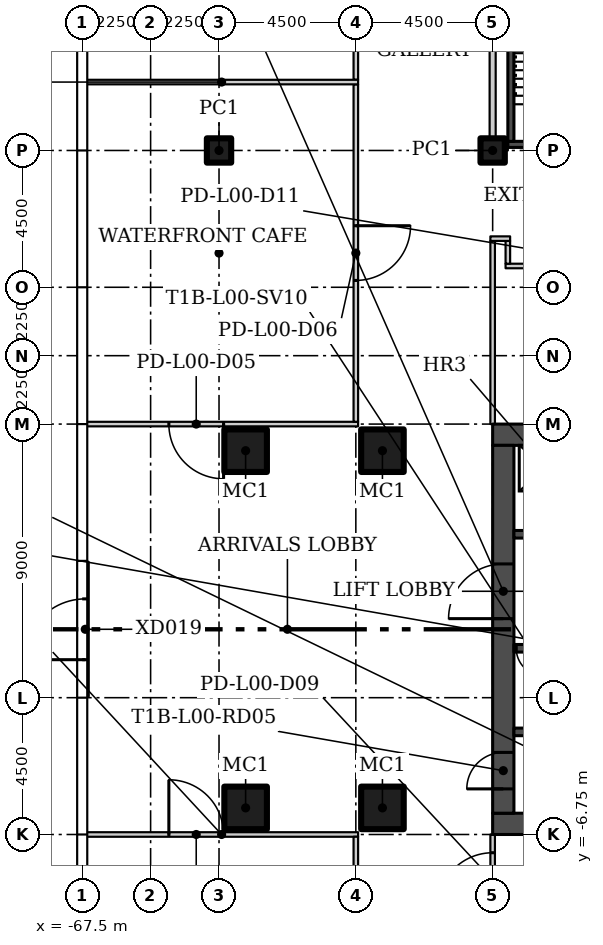
"""IFC4 building model, lengths in metres.
Left out: names, types, materials, properties, quantities, classifications, styles, units other than length and angle.
Written with IfcOpenShell. Run it as: python <this file> out.ifc"""

import sys

from ifc_helpers import new_model, si_unit, direction, frame, frame_2d, origin, origin_2d, place, context, subcontext, project, spatial, rectangle, hollow_rectangle, extrude, element, fill, save


model = new_model("IFC4")
c1 = context("Model", 3, precision=1e-05, world=origin(), true_north=direction((0.0, 1.0)))
c2 = subcontext(c1, "Body", "Model", "MODEL_VIEW")
j1 = project(units=[si_unit("LENGTHUNIT", "METRE"), si_unit("PLANEANGLEUNIT", "RADIAN")], contexts=[c1])
p1 = place(None, origin())
s1 = spatial("IfcSite", under=j1, at=p1, CompositionType="ELEMENT")
p2 = place(p1, origin())
s2 = spatial("IfcBuilding", under=s1, at=p2, CompositionType="ELEMENT")
p3 = place(p2, origin())
s3 = spatial("IfcBuildingStorey", under=s2, at=p3, CompositionType="ELEMENT", Elevation=0.0)
for number, where in (
    (1, (-57.625, -5.875, 0.0)),
    (2, (-62.125, -5.875, 0.0)),
    (3, (-57.625, 5.875, 0.0)),
    (4, (-62.125, 5.875, 0.0)),
):
    element("IfcColumn", number, at=place(p3, frame(where)), inside=s3, PredefinedType="COLUMN", context=c2, shape_type="SweptSolid", body=[
        extrude(hollow_rectangle(XDim=1.4, YDim=1.4, WallThickness=0.06, at=origin_2d()), origin(), (0.0, 0.0, 1.0), 6.1),
    ])
for number, where in (
    (5, (-63.0, 15.75, 0.0)),
    (6, (-54.0, 15.75, 0.0)),
):
    element("IfcColumn", number, at=place(p3, frame(where)), inside=s3, PredefinedType="COLUMN", context=c2, shape_type="SweptSolid", body=[
        extrude(hollow_rectangle(XDim=0.8, YDim=0.8, WallThickness=0.03, at=origin_2d()), origin(), (0.0, 0.0, 1.0), 6.1),
    ])
p4 = place(p3, frame((-53.575, 11.95, 0.0)))
e7 = element("IfcWall", 7, at=p4, inside=s3, PredefinedType="PARTITIONING", context=c2, shape_type="SweptSolid", body=[
    extrude(rectangle(XDim=9.175, YDim=0.15, at=frame_2d((4.587, 0.0))), origin(), (0.0, 0.0, 1.0), 6.1),
])
p5 = place(p4, frame((3.175, 0.0, 0.0)))
e8 = element("IfcOpeningElement", 8, at=p5, cuts=e7, PredefinedType="OPENING", context=c2, shape_type="SweptSolid", body=[
    extrude(rectangle(XDim=1.8, YDim=2.4, at=frame_2d((0.9, 1.2))), frame((0.0, 0.085, 0.0), z_axis=(0.0, -1.0, 0.0), x_axis=(1.0, 0.0, 0.0)), (0.0, 0.0, 1.0), 0.17),
])
p6 = place(p3, frame((-58.425, 6.75, 0.0), z_axis=(0.0, 0.0, 1.0), x_axis=(-1.0, 0.0, 0.0)))
e9 = element("IfcWall", 9, at=p6, inside=s3, PredefinedType="PARTITIONING", context=c2, shape_type="SweptSolid", body=[
    extrude(rectangle(XDim=8.98, YDim=0.15, at=frame_2d((4.49, 0.0))), origin(), (0.0, 0.0, 1.0), 6.1),
])
p7 = place(p6, frame((4.425, 0.0, 0.0)))
e10 = element("IfcOpeningElement", 10, at=p7, cuts=e9, PredefinedType="OPENING", context=c2, shape_type="SweptSolid", body=[
    extrude(rectangle(XDim=1.8, YDim=2.4, at=frame_2d((0.9, 1.2))), frame((0.0, 0.085, 0.0), z_axis=(0.0, -1.0, 0.0), x_axis=(1.0, 0.0, 0.0)), (0.0, 0.0, 1.0), 0.17),
])
p8 = place(p3, frame((-67.405, -6.75, 0.0)))
e11 = element("IfcWall", 11, at=p8, inside=s3, PredefinedType="PARTITIONING", context=c2, shape_type="SweptSolid", body=[
    extrude(rectangle(XDim=8.98, YDim=0.15, at=frame_2d((4.49, 0.0))), origin(), (0.0, 0.0, 1.0), 6.1),
])
p9 = place(p8, frame((2.755, 0.0, 0.0)))
e12 = element("IfcOpeningElement", 12, at=p9, cuts=e11, PredefinedType="OPENING", context=c2, shape_type="SweptSolid", body=[
    extrude(rectangle(XDim=1.8, YDim=2.4, at=frame_2d((0.9, 1.2))), frame((0.0, 0.085, 0.0), z_axis=(0.0, -1.0, 0.0), x_axis=(1.0, 0.0, 0.0)), (0.0, 0.0, 1.0), 0.17),
])
p10 = place(p3, frame((-54.0, -17.275, 0.0), z_axis=(0.0, 0.0, 1.0), x_axis=(0.0, 1.0, 0.0)))
e13 = element("IfcWall", 13, at=p10, inside=s3, PredefinedType="PARTITIONING", context=c2, shape_type="SweptSolid", body=[
    extrude(rectangle(XDim=10.525, YDim=0.15, at=frame_2d((5.262, 0.0))), origin(), (0.0, 0.0, 1.0), 6.1),
])
p11 = place(p10, frame((3.625, 0.0, 0.0)))
e14 = element("IfcOpeningElement", 14, at=p11, cuts=e13, PredefinedType="OPENING", context=c2, shape_type="SweptSolid", body=[
    extrude(rectangle(XDim=1.8, YDim=2.4, at=frame_2d((0.9, 1.2))), frame((0.0, 0.085, 0.0), z_axis=(0.0, -1.0, 0.0), x_axis=(1.0, 0.0, 0.0)), (0.0, 0.0, 1.0), 0.17),
])
p12 = place(p10, frame((8.125, 0.0, 0.0)))
e15 = element("IfcOpeningElement", 15, at=p12, cuts=e13, PredefinedType="OPENING", context=c2, shape_type="SweptSolid", body=[
    extrude(rectangle(XDim=1.8, YDim=2.4, at=frame_2d((0.9, 1.2))), frame((0.0, 0.085, 0.0), z_axis=(0.0, -1.0, 0.0), x_axis=(1.0, 0.0, 0.0)), (0.0, 0.0, 1.0), 0.17),
])
p13 = place(p3, frame((-54.0, 6.75, 0.0), z_axis=(0.0, 0.0, 1.0), x_axis=(0.0, 1.0, 0.0)))
e16 = element("IfcWall", 16, at=p13, inside=s3, PredefinedType="PARTITIONING", context=c2, shape_type="SweptSolid", body=[
    extrude(rectangle(XDim=6.025, YDim=0.15, at=frame_2d((3.012, 0.0))), origin(), (0.0, 0.0, 1.0), 6.1),
])
p14 = place(p3, frame((-54.0, 33.655, 0.0), z_axis=(0.0, 0.0, 1.0), x_axis=(0.0, -1.0, 0.0)))
e17 = element("IfcWall", 17, at=p14, inside=s3, PredefinedType="PARTITIONING", context=c2, shape_type="SweptSolid", body=[
    extrude(rectangle(XDim=17.705, YDim=0.2, at=frame_2d((8.853, 0.0))), origin(), (0.0, 0.0, 1.0), 6.1),
])
p15 = place(p14, frame((7.455, 0.0, 0.0)))
e18 = element("IfcOpeningElement", 18, at=p15, cuts=e17, PredefinedType="OPENING", context=c2, shape_type="SweptSolid", body=[
    extrude(rectangle(XDim=1.0, YDim=2.1, at=frame_2d((0.5, 1.05))), frame((0.0, 0.11, 0.0), z_axis=(0.0, -1.0, 0.0), x_axis=(1.0, 0.0, 0.0)), (0.0, 0.0, 1.0), 0.22),
])
p16 = place(p3, frame((-58.5, 17.925, 0.0), z_axis=(0.0, 0.0, 1.0), x_axis=(0.0, -1.0, 0.0)))
e19 = element("IfcWall", 19, at=p16, inside=s3, PredefinedType="PARTITIONING", context=c2, shape_type="SweptSolid", body=[
    extrude(rectangle(XDim=11.1, YDim=0.15, at=frame_2d((5.55, 0.0))), origin(), (0.0, 0.0, 1.0), 6.1),
])
p17 = place(p16, frame((4.65, 0.0, 0.0)))
e20 = element("IfcOpeningElement", 20, at=p17, cuts=e19, PredefinedType="OPENING", context=c2, shape_type="SweptSolid", body=[
    extrude(rectangle(XDim=1.8, YDim=2.4, at=frame_2d((0.9, 1.2))), frame((0.0, 0.085, 0.0), z_axis=(0.0, -1.0, 0.0), x_axis=(1.0, 0.0, 0.0)), (0.0, 0.0, 1.0), 0.17),
])
p18 = place(p3, frame((-58.5, -6.825, 0.0), z_axis=(0.0, 0.0, 1.0), x_axis=(0.0, -1.0, 0.0)))
e21 = element("IfcWall", 21, at=p18, inside=s3, PredefinedType="PARTITIONING", context=c2, shape_type="SweptSolid", body=[
    extrude(rectangle(XDim=22.35, YDim=0.15, at=frame_2d((11.175, 0.0))), origin(), (0.0, 0.0, 1.0), 6.1),
])
p19 = place(p18, frame((6.9, 0.0, 0.0)))
e22 = element("IfcOpeningElement", 22, at=p19, cuts=e21, PredefinedType="OPENING", context=c2, shape_type="SweptSolid", body=[
    extrude(rectangle(XDim=1.8, YDim=2.4, at=frame_2d((0.9, 1.2))), frame((0.0, 0.085, 0.0), z_axis=(0.0, -1.0, 0.0), x_axis=(1.0, 0.0, 0.0)), (0.0, 0.0, 1.0), 0.17),
])
p20 = place(p18, frame((18.15, 0.0, 0.0)))
e23 = element("IfcOpeningElement", 23, at=p20, cuts=e21, PredefinedType="OPENING", context=c2, shape_type="SweptSolid", body=[
    extrude(rectangle(XDim=1.8, YDim=2.4, at=frame_2d((0.9, 1.2))), frame((0.0, 0.085, 0.0), z_axis=(0.0, -1.0, 0.0), x_axis=(1.0, 0.0, 0.0)), (0.0, 0.0, 1.0), 0.17),
])
p21 = place(p3, frame((-58.5, 18.075, 0.0), z_axis=(0.0, 0.0, 1.0), x_axis=(0.0, 1.0, 0.0)))
e24 = element("IfcWall", 24, at=p21, inside=s3, PredefinedType="PARTITIONING", context=c2, shape_type="SweptSolid", body=[
    extrude(rectangle(XDim=15.58, YDim=0.15, at=frame_2d((7.79, 0.0))), origin(), (0.0, 0.0, 1.0), 6.1),
])
p22 = place(p21, frame((7.35, 0.0, 0.0)))
e25 = element("IfcOpeningElement", 25, at=p22, cuts=e24, PredefinedType="OPENING", context=c2, shape_type="SweptSolid", body=[
    extrude(rectangle(XDim=0.9, YDim=2.1, at=frame_2d((0.45, 1.05))), frame((0.0, 0.085, 0.0), z_axis=(0.0, -1.0, 0.0), x_axis=(1.0, 0.0, 0.0)), (0.0, 0.0, 1.0), 0.17),
])
p23 = place(p3, frame((-53.5, 12.775, 0.0), z_axis=(0.0, 0.0, 1.0), x_axis=(0.0, -1.0, 0.0)))
e26 = element("IfcWall", 26, at=p23, inside=s3, PredefinedType="PARTITIONING", context=c2, shape_type="SweptSolid", body=[
    extrude(rectangle(XDim=0.75, YDim=0.15, at=frame_2d((0.375, 0.0))), origin(), (0.0, 0.0, 1.0), 6.1),
])
p24 = place(p3, frame((-54.075, 12.85, 0.0)))
e27 = element("IfcWall", 27, at=p24, inside=s3, PredefinedType="PARTITIONING", context=c2, shape_type="SweptSolid", body=[
    extrude(rectangle(XDim=0.65, YDim=0.15, at=frame_2d((0.325, 0.0))), origin(), (0.0, 0.0, 1.0), 6.1),
])
p25 = place(p3, frame((-54.1, 15.85, 0.0)))
e28 = element("IfcWall", 28, at=p25, inside=s3, PredefinedType="PARTITIONING", context=c2, shape_type="SweptSolid", body=[
    extrude(rectangle(XDim=0.6, YDim=0.2, at=frame_2d((0.3, 0.0))), origin(), (0.0, 0.0, 1.0), 6.1),
])
p26 = place(p3, frame((-58.425, 18.0, 0.0), z_axis=(0.0, 0.0, 1.0), x_axis=(-1.0, 0.0, 0.0)))
e29 = element("IfcWall", 29, at=p26, inside=s3, PredefinedType="PARTITIONING", context=c2, shape_type="SweptSolid", body=[
    extrude(rectangle(XDim=8.98, YDim=0.15, at=frame_2d((4.49, 0.0))), origin(), (0.0, 0.0, 1.0), 6.1),
])
p27 = place(p3, frame((-67.4, -2.21, 0.0), z_axis=(0.0, 0.0, 1.0), x_axis=(0.0, 1.0, 0.0)))
e30 = element("IfcWall", 30, at=p27, inside=s3, PredefinedType="SOLIDWALL", context=c2, shape_type="SweptSolid", body=[
    extrude(rectangle(XDim=4.42, YDim=0.2, at=frame_2d((2.21, 0.0))), origin(), (0.0, 0.0, 1.0), 3.0),
])
p28 = place(p27, frame((1.21, 0.0, 0.0)))
e31 = element("IfcOpeningElement", 31, at=p28, cuts=e30, PredefinedType="OPENING", context=c2, shape_type="SweptSolid", body=[
    extrude(rectangle(XDim=2.0, YDim=2.4, at=frame_2d((1.0, 1.2))), frame((0.0, 0.11, 0.0), z_axis=(0.0, -1.0, 0.0), x_axis=(1.0, 0.0, 0.0)), (0.0, 0.0, 1.0), 0.22),
])
for number, where, z_axis, x_axis in (
    (32, (-40.5, -6.4, 0.0), (0.0, 0.0, 1.0), (-1.0, 0.0, 0.0)),
    (33, (-40.5, 6.4, 0.0), (0.0, 0.0, 1.0), (-1.0, 0.0, 0.0)),
):
    element("IfcWall", number, at=place(p3, frame(where, z_axis=z_axis, x_axis=x_axis)), inside=s3, PredefinedType="SHEAR", context=c2, shape_type="SweptSolid", body=[
        extrude(rectangle(XDim=13.5, YDim=0.7, at=frame_2d((6.75, 0.0))), origin(), (0.0, 0.0, 1.0), 6.1),
    ])
p29 = place(p3, frame((-53.65, -6.05, 0.0), z_axis=(0.0, 0.0, 1.0), x_axis=(0.0, 1.0, 0.0)))
e34 = element("IfcWall", 34, at=p29, inside=s3, PredefinedType="SHEAR", context=c2, shape_type="SweptSolid", body=[
    extrude(rectangle(XDim=12.1, YDim=0.7, at=frame_2d((6.05, 0.0))), origin(), (0.0, 0.0, 1.0), 6.1),
])
p30 = place(p29, frame((0.8, 0.0, 0.0)))
e35 = element("IfcOpeningElement", 35, at=p30, cuts=e34, PredefinedType="OPENING", context=c2, shape_type="SweptSolid", body=[
    extrude(rectangle(XDim=1.2, YDim=2.1, at=frame_2d((0.6, 1.05))), frame((0.0, 0.36, 0.0), z_axis=(0.0, -1.0, 0.0), x_axis=(1.0, 0.0, 0.0)), (0.0, 0.0, 1.0), 0.72),
])
p31 = place(p29, frame((6.4, 0.0, 0.0)))
e36 = element("IfcOpeningElement", 36, at=p31, cuts=e34, PredefinedType="OPENING", context=c2, shape_type="SweptSolid", body=[
    extrude(rectangle(XDim=1.8, YDim=2.4, at=frame_2d((0.9, 1.2))), frame((0.0, 0.36, 0.0), z_axis=(0.0, -1.0, 0.0), x_axis=(1.0, 0.0, 0.0)), (0.0, 0.0, 1.0), 0.72),
])
p32 = place(p3, frame((-41.2, -3.375, 0.0), z_axis=(0.0, 0.0, 1.0), x_axis=(-1.0, 0.0, 0.0)))
e37 = element("IfcWall", 37, at=p32, inside=s3, PredefinedType="SHEAR", context=c2, shape_type="SweptSolid", body=[
    extrude(rectangle(XDim=12.1, YDim=0.25, at=frame_2d((6.05, 0.0))), origin(), (0.0, 0.0, 1.0), 6.1),
])
p33 = place(p32, frame((0.05, 0.0, 0.0)))
e38 = element("IfcOpeningElement", 38, at=p33, cuts=e37, PredefinedType="OPENING", context=c2, shape_type="SweptSolid", body=[
    extrude(rectangle(XDim=1.1, YDim=2.1, at=frame_2d((0.55, 1.05))), frame((0.0, 0.135, 0.0), z_axis=(0.0, -1.0, 0.0), x_axis=(1.0, 0.0, 0.0)), (0.0, 0.0, 1.0), 0.27),
])
p34 = place(p3, frame((-41.2, -0.625, 0.0), z_axis=(0.0, 0.0, 1.0), x_axis=(-1.0, 0.0, 0.0)))
e39 = element("IfcWall", 39, at=p34, inside=s3, PredefinedType="SHEAR", context=c2, shape_type="SweptSolid", body=[
    extrude(rectangle(XDim=12.1, YDim=0.25, at=frame_2d((6.05, 0.0))), origin(), (0.0, 0.0, 1.0), 6.1),
])
p35 = place(p34, frame((2.25, 0.0, 0.0)))
e40 = element("IfcOpeningElement", 40, at=p35, cuts=e39, PredefinedType="OPENING", context=c2, shape_type="SweptSolid", body=[
    extrude(rectangle(XDim=1.2, YDim=2.1, at=frame_2d((0.6, 1.05))), frame((0.0, 0.135, 0.0), z_axis=(0.0, -1.0, 0.0), x_axis=(1.0, 0.0, 0.0)), (0.0, 0.0, 1.0), 0.27),
])
p36 = place(p34, frame((9.5, 0.0, 0.0)))
e41 = element("IfcOpeningElement", 41, at=p36, cuts=e39, PredefinedType="OPENING", context=c2, shape_type="SweptSolid", body=[
    extrude(rectangle(XDim=0.9, YDim=2.1, at=frame_2d((0.45, 1.05))), frame((0.0, 0.135, 0.0), z_axis=(0.0, -1.0, 0.0), x_axis=(1.0, 0.0, 0.0)), (0.0, 0.0, 1.0), 0.27),
])
p37 = place(p34, frame((11.125, 0.0, 0.0)))
e42 = element("IfcOpeningElement", 42, at=p37, cuts=e39, PredefinedType="OPENING", context=c2, shape_type="SweptSolid", body=[
    extrude(rectangle(XDim=0.9, YDim=2.1, at=frame_2d((0.45, 1.05))), frame((0.0, 0.135, 0.0), z_axis=(0.0, -1.0, 0.0), x_axis=(1.0, 0.0, 0.0)), (0.0, 0.0, 1.0), 0.27),
])
p38 = place(p3, frame((-48.5, 3.125, 0.0), z_axis=(0.0, 0.0, 1.0), x_axis=(-1.0, 0.0, 0.0)))
e43 = element("IfcWall", 43, at=p38, inside=s3, PredefinedType="SHEAR", context=c2, shape_type="SweptSolid", body=[
    extrude(rectangle(XDim=4.8, YDim=0.25, at=frame_2d((2.4, 0.0))), origin(), (0.0, 0.0, 1.0), 6.1),
])
p39 = place(p38, frame((0.775, 0.0, 0.0)))
e44 = element("IfcOpeningElement", 44, at=p39, cuts=e43, PredefinedType="OPENING", context=c2, shape_type="SweptSolid", body=[
    extrude(rectangle(XDim=1.1, YDim=2.1, at=frame_2d((0.55, 1.05))), frame((0.0, 0.135, 0.0), z_axis=(0.0, -1.0, 0.0), x_axis=(1.0, 0.0, 0.0)), (0.0, 0.0, 1.0), 0.27),
])
p40 = place(p38, frame((3.175, 0.0, 0.0)))
e45 = element("IfcOpeningElement", 45, at=p40, cuts=e43, PredefinedType="OPENING", context=c2, shape_type="SweptSolid", body=[
    extrude(rectangle(XDim=1.1, YDim=2.1, at=frame_2d((0.55, 1.05))), frame((0.0, 0.135, 0.0), z_axis=(0.0, -1.0, 0.0), x_axis=(1.0, 0.0, 0.0)), (0.0, 0.0, 1.0), 0.27),
])
p41 = place(p3, frame((-53.5, 15.95, 0.0)))
e46 = element("IfcWall", 46, at=p41, inside=s3, PredefinedType="SHEAR", context=c2, shape_type="SweptSolid", body=[
    extrude(rectangle(XDim=8.0, YDim=0.2, at=frame_2d((4.0, 0.0))), origin(), (0.0, 0.0, 1.0), 6.1),
])
p42 = place(p41, frame((1.462, 0.0, 0.0)))
e47 = element("IfcOpeningElement", 47, at=p42, cuts=e46, PredefinedType="OPENING", context=c2, shape_type="SweptSolid", body=[
    extrude(rectangle(XDim=1.2, YDim=2.4, at=frame_2d((0.6, 1.2))), frame((0.0, 0.11, 0.0), z_axis=(0.0, -1.0, 0.0), x_axis=(1.0, 0.0, 0.0)), (0.0, 0.0, 1.0), 0.22),
])
p43 = place(p41, frame((5.337, 0.0, 0.0)))
e48 = element("IfcOpeningElement", 48, at=p43, cuts=e46, PredefinedType="OPENING", context=c2, shape_type="SweptSolid", body=[
    extrude(rectangle(XDim=1.2, YDim=2.4, at=frame_2d((0.6, 1.2))), frame((0.0, 0.11, 0.0), z_axis=(0.0, -1.0, 0.0), x_axis=(1.0, 0.0, 0.0)), (0.0, 0.0, 1.0), 0.22),
])
p44 = place(p3, frame((-53.4, 16.05, 0.0), z_axis=(0.0, 0.0, 1.0), x_axis=(0.0, 1.0, 0.0)))
e49 = element("IfcWall", 49, at=p44, inside=s3, PredefinedType="SHEAR", context=c2, shape_type="SweptSolid", body=[
    extrude(rectangle(XDim=8.4, YDim=0.2, at=frame_2d((4.2, 0.0))), origin(), (0.0, 0.0, 1.0), 6.1),
])
p45 = place(p9, origin())
e50 = element("IfcDoor", 50, at=p45, inside=s3, OperationType="DOUBLE_DOOR_SINGLE_SWING", PredefinedType="DOOR", context=c2, shape_type="SweptSolid", body=[
    extrude(rectangle(XDim=1.8, YDim=2.4, at=frame_2d((0.9, 1.2))), frame((0.0, 0.025, 0.0), z_axis=(0.0, -1.0, 0.0), x_axis=(1.0, 0.0, 0.0)), (0.0, 0.0, 1.0), 0.05),
])
fill(e12, e50)
p46 = place(p7, origin())
e51 = element("IfcDoor", 51, at=p46, inside=s3, OperationType="DOUBLE_DOOR_SINGLE_SWING", PredefinedType="DOOR", context=c2, shape_type="SweptSolid", body=[
    extrude(rectangle(XDim=1.8, YDim=2.4, at=frame_2d((0.9, 1.2))), frame((0.0, 0.025, 0.0), z_axis=(0.0, -1.0, 0.0), x_axis=(1.0, 0.0, 0.0)), (0.0, 0.0, 1.0), 0.05),
])
fill(e10, e51)
p47 = place(p17, origin())
e52 = element("IfcDoor", 52, at=p47, inside=s3, OperationType="DOUBLE_DOOR_SINGLE_SWING", PredefinedType="DOOR", context=c2, shape_type="SweptSolid", body=[
    extrude(rectangle(XDim=1.8, YDim=2.4, at=frame_2d((0.9, 1.2))), frame((0.0, 0.025, 0.0), z_axis=(0.0, -1.0, 0.0), x_axis=(1.0, 0.0, 0.0)), (0.0, 0.0, 1.0), 0.05),
])
fill(e20, e52)
p48 = place(p12, origin())
e53 = element("IfcDoor", 53, at=p48, inside=s3, OperationType="DOUBLE_DOOR_SINGLE_SWING", PredefinedType="DOOR", context=c2, shape_type="SweptSolid", body=[
    extrude(rectangle(XDim=1.8, YDim=2.4, at=frame_2d((0.9, 1.2))), frame((0.0, 0.025, 0.0), z_axis=(0.0, -1.0, 0.0), x_axis=(1.0, 0.0, 0.0)), (0.0, 0.0, 1.0), 0.05),
])
fill(e15, e53)
p49 = place(p28, origin())
e54 = element("IfcDoor", 54, at=p49, inside=s3, OperationType="DOUBLE_DOOR_SINGLE_SWING", PredefinedType="DOOR", context=c2, shape_type="SweptSolid", body=[
    extrude(rectangle(XDim=2.0, YDim=2.4, at=frame_2d((1.0, 1.2))), frame((0.0, 0.025, 0.0), z_axis=(0.0, -1.0, 0.0), x_axis=(1.0, 0.0, 0.0)), (0.0, 0.0, 1.0), 0.05),
])
fill(e31, e54)
p50 = place(p30, origin())
e55 = element("IfcDoor", 55, at=p50, inside=s3, OperationType="SINGLE_SWING_LEFT", PredefinedType="DOOR", context=c2, shape_type="SweptSolid", body=[
    extrude(rectangle(XDim=1.2, YDim=2.1, at=frame_2d((0.6, 1.05))), frame((0.0, 0.025, 0.0), z_axis=(0.0, -1.0, 0.0), x_axis=(1.0, 0.0, 0.0)), (0.0, 0.0, 1.0), 0.05),
])
fill(e35, e55)
p51 = place(p31, origin())
e56 = element("IfcDoor", 56, at=p51, inside=s3, OperationType="DOUBLE_DOOR_SINGLE_SWING", PredefinedType="DOOR", context=c2, shape_type="SweptSolid", body=[
    extrude(rectangle(XDim=1.8, YDim=2.4, at=frame_2d((0.9, 1.2))), frame((0.0, 0.025, 0.0), z_axis=(0.0, -1.0, 0.0), x_axis=(1.0, 0.0, 0.0)), (0.0, 0.0, 1.0), 0.05),
])
fill(e36, e56)
p52 = place(p37, origin())
e57 = element("IfcDoor", 57, at=p52, inside=s3, OperationType="SINGLE_SWING_RIGHT", PredefinedType="DOOR", context=c2, shape_type="SweptSolid", body=[
    extrude(rectangle(XDim=0.9, YDim=2.1, at=frame_2d((0.45, 1.05))), frame((0.0, 0.025, 0.0), z_axis=(0.0, -1.0, 0.0), x_axis=(1.0, 0.0, 0.0)), (0.0, 0.0, 1.0), 0.05),
])
fill(e42, e57)
save(model, sys.argv[1])
